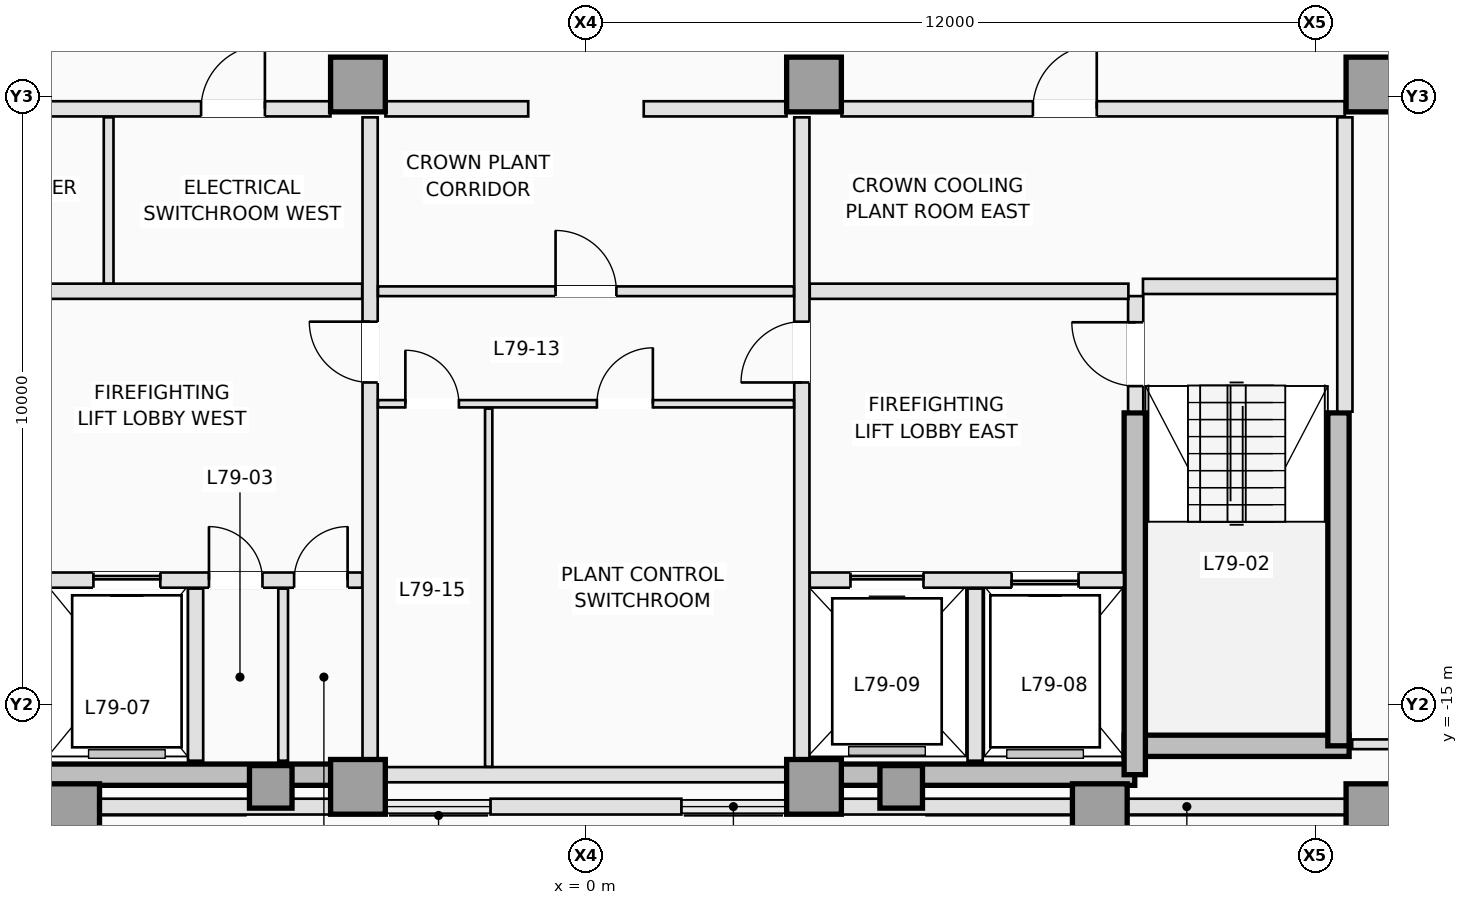
"""IFC4 building model, lengths in metres.
Left out: names, types, materials, properties, quantities, classifications, styles, units other than length and angle.
Written with IfcOpenShell. Run it as: python <this file> out.ifc"""

import sys

from ifc_helpers import new_model, si_unit, direction, frame, frame_2d, origin, origin_2d, place, context, subcontext, project, spatial, rectangle, extrude, element, fill, save


model = new_model("IFC4")
c1 = context("Model", 3, precision=1e-05, world=origin(), true_north=direction((0.0, 1.0)))
c2 = subcontext(c1, "Body", "Model", "MODEL_VIEW")
j1 = project(units=[si_unit("LENGTHUNIT", "METRE"), si_unit("PLANEANGLEUNIT", "RADIAN")], contexts=[c1])
p1 = place(None, origin())
s1 = spatial("IfcSite", under=j1, at=p1, CompositionType="ELEMENT")
p2 = place(p1, origin())
s2 = spatial("IfcBuilding", under=s1, at=p2, CompositionType="ELEMENT")
p3 = place(p2, frame((0.0, 0.0, 283.7)))
s3 = spatial("IfcBuildingStorey", under=s2, at=p3, CompositionType="ELEMENT", Elevation=283.7)
for number, where, z_axis, x_axis in (
    (1, (-9.025, -16.15, 0.0), (0.0, 0.0, 1.0), (1.0, 0.0, 0.0)),
    (2, (3.75, -16.15, 0.0), (0.0, 0.0, 1.0), (1.0, 0.0, 0.0)),
):
    element("IfcWall", number, at=place(p3, frame(where, z_axis=z_axis, x_axis=x_axis)), inside=s3, PredefinedType="SHEAR", context=c2, shape_type="SweptSolid", body=[
        extrude(rectangle(XDim=5.275, YDim=0.35, at=frame_2d((2.637, 0.0))), origin(), (0.0, 0.0, 1.0), 3.2),
    ])
p4 = place(p3, frame((8.85, -15.675, 0.0), z_axis=(0.0, 0.0, 1.0), x_axis=(1.0, 0.0, 0.0)))
e3 = element("IfcWall", 3, at=p4, inside=s3, PredefinedType="SHEAR", context=c2, shape_type="SweptSolid", body=[
    extrude(rectangle(XDim=3.7, YDim=0.35, at=frame_2d((1.85, 0.0))), origin(), (0.0, 0.0, 1.0), 3.2),
])
p5 = place(p3, frame((12.375, -15.675, 0.0), z_axis=(0.0, 0.0, 1.0), x_axis=(0.0, 1.0, 0.0)))
e4 = element("IfcWall", 4, at=p5, inside=s3, PredefinedType="SHEAR", context=c2, shape_type="SweptSolid", body=[
    extrude(rectangle(XDim=5.475, YDim=0.35, at=frame_2d((2.738, 0.0))), origin(), (0.0, 0.0, 1.0), 3.2),
])
p6 = place(p3, frame((9.025, -16.15, 0.0), z_axis=(0.0, 0.0, 1.0), x_axis=(0.0, 1.0, 0.0)))
e5 = element("IfcWall", 5, at=p6, inside=s3, PredefinedType="SHEAR", context=c2, shape_type="SweptSolid", body=[
    extrude(rectangle(XDim=5.95, YDim=0.35, at=frame_2d((2.975, 0.0))), origin(), (0.0, 0.0, 1.0), 3.2),
])
for number, where, z_axis, x_axis in (
    (6, (-8.45, -16.75, 0.0), (0.0, 0.0, 1.0), (1.0, 0.0, 0.0)),
    (7, (-3.75, -16.35, 0.0), (0.0, 0.0, 1.0), (1.0, 0.0, 0.0)),
    (8, (3.75, -16.35, 0.0), (0.0, 0.0, 1.0), (1.0, 0.0, 0.0)),
    (9, (8.45, -16.75, 0.0), (0.0, 0.0, 1.0), (1.0, 0.0, 0.0)),
    (10, (12.95, -16.75, 0.0), (0.0, 0.0, 1.0), (1.0, 0.0, 0.0)),
    (11, (-3.75, -4.8, 0.0), (0.0, 0.0, 1.0), (1.0, 0.0, 0.0)),
    (12, (3.75, -4.8, 0.0), (0.0, 0.0, 1.0), (1.0, 0.0, 0.0)),
    (13, (12.95, -4.8, 0.0), (0.0, 0.0, 1.0), (1.0, 0.0, 0.0)),
):
    element("IfcColumn", number, at=place(p3, frame(where, z_axis=z_axis, x_axis=x_axis)), inside=s3, PredefinedType="COLUMN", context=c2, shape_type="SweptSolid", body=[
        extrude(rectangle(XDim=0.9, YDim=0.9, at=origin_2d()), origin(), (0.0, 0.0, 1.0), 3.2),
    ])
for number, where, z_axis, x_axis in (
    (14, (-5.184, -16.35, 0.0), (0.0, 0.0, 1.0), (0.0, 1.0, 0.0)),
    (15, (5.184, -16.35, 0.0), (0.0, 0.0, 1.0), (0.0, 1.0, 0.0)),
):
    element("IfcColumn", number, at=place(p3, frame(where, z_axis=z_axis, x_axis=x_axis)), inside=s3, PredefinedType="COLUMN", context=c2, shape_type="SweptSolid", body=[
        extrude(rectangle(XDim=0.7, YDim=0.7, at=origin_2d()), origin(), (0.0, 0.0, 1.0), 3.2),
    ])
for number, where, z_axis, x_axis in (
    (16, (15.542, -16.675, 0.0), (0.0, 0.0, 1.0), (-1.0, 0.0, 0.0)),
    (17, (-4.22, -16.675, 0.0), (0.0, 0.0, 1.0), (-1.0, 0.0, 0.0)),
):
    element("IfcWall", number, at=place(p3, frame(where, z_axis=z_axis, x_axis=x_axis)), inside=s3, PredefinedType="STANDARD", context=c2, shape_type="SweptSolid", body=[
        extrude(rectangle(XDim=11.323, YDim=0.26, at=frame_2d((5.661, 0.0))), origin(), (0.0, 0.0, 1.0), 2.234),
    ])
p7 = place(p3, frame((1.569, -16.675, 0.0), z_axis=(0.0, 0.0, 1.0), x_axis=(-1.0, 0.0, 0.0)))
e18 = element("IfcWall", 18, at=p7, inside=s3, PredefinedType="STANDARD", context=c2, shape_type="SweptSolid", body=[
    extrude(rectangle(XDim=3.138, YDim=0.26, at=frame_2d((1.569, 0.0))), origin(), (0.0, 0.0, 1.0), 2.95),
])
p8 = place(p3, frame((13.283, -2.877, 0.0), z_axis=(0.0, 0.0, 1.0), x_axis=(0.490270316201, -0.871570431492, 0.0)))
e19 = element("IfcWall", 19, at=p8, inside=s3, PredefinedType="STANDARD", context=c2, shape_type="SweptSolid", body=[
    extrude(rectangle(XDim=10.216, YDim=0.26, at=frame_2d((5.108, 0.0))), origin(), (0.0, 0.0, 1.0), 2.95),
])
p9 = place(p3, frame((9.04, -10.18, 0.0), z_axis=(0.0, 0.0, 1.0), x_axis=(0.0, 1.0, 0.0)))
e20 = element("IfcWall", 20, at=p9, inside=s3, PredefinedType="PARTITIONING", context=c2, shape_type="SweptSolid", body=[
    extrude(rectangle(XDim=1.9, YDim=0.25, at=frame_2d((0.95, 0.0))), origin(), (0.0, 0.0, 1.0), 2.95),
])
p10 = place(p9, frame((0.42, 0.0, 0.0)))
e21 = element("IfcOpeningElement", 21, at=p10, cuts=e20, PredefinedType="OPENING", context=c2, shape_type="SweptSolid", body=[
    extrude(rectangle(XDim=1.05, YDim=2.15, at=frame_2d((0.525, 1.075))), frame((0.0, 0.135, 0.0), z_axis=(0.0, -1.0, 0.0), x_axis=(1.0, 0.0, 0.0)), (0.0, 0.0, 1.0), 0.27),
])
p11 = place(p3, frame((9.16, -8.12, 0.0), z_axis=(0.0, 0.0, 1.0), x_axis=(1.0, 0.0, 0.0)))
e22 = element("IfcWall", 22, at=p11, inside=s3, PredefinedType="PARTITIONING", context=c2, shape_type="SweptSolid", body=[
    extrude(rectangle(XDim=3.22, YDim=0.25, at=frame_2d((1.61, 0.0))), origin(), (0.0, 0.0, 1.0), 2.95),
])
p12 = place(p3, frame((12.48, -10.18, 0.0), z_axis=(0.0, 0.0, 1.0), x_axis=(0.0, 1.0, 0.0)))
e23 = element("IfcWall", 23, at=p12, inside=s3, PredefinedType="PARTITIONING", context=c2, shape_type="SweptSolid", body=[
    extrude(rectangle(XDim=4.84, YDim=0.25, at=frame_2d((2.42, 0.0))), origin(), (0.0, 0.0, 1.0), 2.95),
])
p13 = place(p3, frame((-8.848, -12.95, 0.0), z_axis=(0.0, 0.0, 1.0), x_axis=(1.0, 0.0, 0.0)))
e24 = element("IfcWall", 24, at=p13, inside=s3, PredefinedType="PARTITIONING", context=c2, shape_type="SweptSolid", body=[
    extrude(rectangle(XDim=5.168, YDim=0.25, at=frame_2d((2.584, 0.0))), origin(), (0.0, 0.0, 1.0), 2.95),
])
p14 = place(p13, frame((0.748, 0.0, 0.0)))
e25 = element("IfcOpeningElement", 25, at=p14, cuts=e24, PredefinedType="OPENING", context=c2, shape_type="SweptSolid", body=[
    extrude(rectangle(XDim=1.1, YDim=2.15, at=frame_2d((0.55, 1.075))), frame((0.0, 0.135, 0.0), z_axis=(0.0, -1.0, 0.0), x_axis=(1.0, 0.0, 0.0)), (0.0, 0.0, 1.0), 0.27),
])
p15 = place(p13, frame((2.648, 0.0, 0.0)))
e26 = element("IfcOpeningElement", 26, at=p15, cuts=e24, PredefinedType="OPENING", context=c2, shape_type="SweptSolid", body=[
    extrude(rectangle(XDim=0.88, YDim=2.1, at=frame_2d((0.44, 1.05))), frame((0.0, 0.135, 0.0), z_axis=(0.0, -1.0, 0.0), x_axis=(1.0, 0.0, 0.0)), (0.0, 0.0, 1.0), 0.27),
])
p16 = place(p13, frame((4.048, 0.0, 0.0)))
e27 = element("IfcOpeningElement", 27, at=p16, cuts=e24, PredefinedType="OPENING", context=c2, shape_type="SweptSolid", body=[
    extrude(rectangle(XDim=0.88, YDim=2.1, at=frame_2d((0.44, 1.05))), frame((0.0, 0.135, 0.0), z_axis=(0.0, -1.0, 0.0), x_axis=(1.0, 0.0, 0.0)), (0.0, 0.0, 1.0), 0.27),
])
p17 = place(p3, frame((3.68, -12.95, 0.0), z_axis=(0.0, 0.0, 1.0), x_axis=(1.0, 0.0, 0.0)))
e28 = element("IfcWall", 28, at=p17, inside=s3, PredefinedType="PARTITIONING", context=c2, shape_type="SweptSolid", body=[
    extrude(rectangle(XDim=5.168, YDim=0.25, at=frame_2d((2.584, 0.0))), origin(), (0.0, 0.0, 1.0), 2.95),
])
p18 = place(p17, frame((3.32, 0.0, 0.0)))
e29 = element("IfcOpeningElement", 29, at=p18, cuts=e28, PredefinedType="OPENING", context=c2, shape_type="SweptSolid", body=[
    extrude(rectangle(XDim=1.1, YDim=2.15, at=frame_2d((0.55, 1.075))), frame((0.0, 0.135, 0.0), z_axis=(0.0, -1.0, 0.0), x_axis=(1.0, 0.0, 0.0)), (0.0, 0.0, 1.0), 0.27),
])
p19 = place(p17, frame((0.67, 0.0, 0.0)))
e30 = element("IfcOpeningElement", 30, at=p19, cuts=e28, PredefinedType="OPENING", context=c2, shape_type="SweptSolid", body=[
    extrude(rectangle(XDim=1.2, YDim=2.15, at=frame_2d((0.6, 1.075))), frame((0.0, 0.135, 0.0), z_axis=(0.0, -1.0, 0.0), x_axis=(1.0, 0.0, 0.0)), (0.0, 0.0, 1.0), 0.27),
])
p20 = place(p3, frame((-6.42, -15.92, 0.0), z_axis=(0.0, 0.0, 1.0), x_axis=(0.0, 1.0, 0.0)))
e31 = element("IfcWall", 31, at=p20, inside=s3, PredefinedType="PARTITIONING", context=c2, shape_type="SweptSolid", body=[
    extrude(rectangle(XDim=2.83, YDim=0.25, at=frame_2d((1.415, 0.0))), origin(), (0.0, 0.0, 1.0), 2.95),
])
p21 = place(p3, frame((-4.98, -15.92, 0.0), z_axis=(0.0, 0.0, 1.0), x_axis=(0.0, 1.0, 0.0)))
e32 = element("IfcWall", 32, at=p21, inside=s3, PredefinedType="PARTITIONING", context=c2, shape_type="SweptSolid", body=[
    extrude(rectangle(XDim=2.83, YDim=0.16, at=frame_2d((1.415, 0.0))), origin(), (0.0, 0.0, 1.0), 2.95),
])
p22 = place(p3, frame((6.4, -15.92, 0.0), z_axis=(0.0, 0.0, 1.0), x_axis=(0.0, 1.0, 0.0)))
e33 = element("IfcWall", 33, at=p22, inside=s3, PredefinedType="PARTITIONING", context=c2, shape_type="SweptSolid", body=[
    extrude(rectangle(XDim=2.83, YDim=0.25, at=frame_2d((1.415, 0.0))), origin(), (0.0, 0.0, 1.0), 2.95),
])
for number, where, z_axis, x_axis in (
    (34, (-8.92, -8.2, 0.0), (0.0, 0.0, 1.0), (1.0, 0.0, 0.0)),
    (35, (3.68, -8.2, 0.0), (0.0, 0.0, 1.0), (1.0, 0.0, 0.0)),
):
    element("IfcWall", number, at=place(p3, frame(where, z_axis=z_axis, x_axis=x_axis)), inside=s3, PredefinedType="PARTITIONING", context=c2, shape_type="SweptSolid", body=[
        extrude(rectangle(XDim=5.24, YDim=0.25, at=frame_2d((2.62, 0.0))), origin(), (0.0, 0.0, 1.0), 2.95),
    ])
p23 = place(p3, frame((-3.55, -15.898, 0.0), z_axis=(0.0, 0.0, 1.0), x_axis=(0.0, 1.0, 0.0)))
e36 = element("IfcWall", 36, at=p23, inside=s3, PredefinedType="PARTITIONING", context=c2, shape_type="SweptSolid", body=[
    extrude(rectangle(XDim=10.558, YDim=0.25, at=frame_2d((5.279, 0.0))), origin(), (0.0, 0.0, 1.0), 2.95),
])
p24 = place(p23, frame((6.198, 0.0, 0.0)))
e37 = element("IfcOpeningElement", 37, at=p24, cuts=e36, PredefinedType="OPENING", context=c2, shape_type="SweptSolid", body=[
    extrude(rectangle(XDim=1.0, YDim=2.15, at=frame_2d((0.5, 1.075))), frame((0.0, 0.135, 0.0), z_axis=(0.0, -1.0, 0.0), x_axis=(1.0, 0.0, 0.0)), (0.0, 0.0, 1.0), 0.27),
])
p25 = place(p3, frame((3.55, -15.898, 0.0), z_axis=(0.0, 0.0, 1.0), x_axis=(0.0, 1.0, 0.0)))
e38 = element("IfcWall", 38, at=p25, inside=s3, PredefinedType="PARTITIONING", context=c2, shape_type="SweptSolid", body=[
    extrude(rectangle(XDim=10.558, YDim=0.25, at=frame_2d((5.279, 0.0))), origin(), (0.0, 0.0, 1.0), 2.95),
])
p26 = place(p25, frame((6.198, 0.0, 0.0)))
e39 = element("IfcOpeningElement", 39, at=p26, cuts=e38, PredefinedType="OPENING", context=c2, shape_type="SweptSolid", body=[
    extrude(rectangle(XDim=1.0, YDim=2.15, at=frame_2d((0.5, 1.075))), frame((0.0, 0.135, 0.0), z_axis=(0.0, -1.0, 0.0), x_axis=(1.0, 0.0, 0.0)), (0.0, 0.0, 1.0), 0.27),
])
p27 = place(p3, frame((-12.48, -5.2, 0.0), z_axis=(0.0, 0.0, 1.0), x_axis=(1.0, 0.0, 0.0)))
e40 = element("IfcWall", 40, at=p27, inside=s3, PredefinedType="PARTITIONING", context=c2, shape_type="SweptSolid", body=[
    extrude(rectangle(XDim=8.278, YDim=0.25, at=frame_2d((4.139, 0.0))), origin(), (0.0, 0.0, 1.0), 2.95),
])
p28 = place(p27, frame((1.85, 0.0, 0.0)))
e41 = element("IfcOpeningElement", 41, at=p28, cuts=e40, PredefinedType="OPENING", context=c2, shape_type="SweptSolid", body=[
    extrude(rectangle(XDim=1.05, YDim=2.12, at=frame_2d((0.525, 1.06))), frame((0.0, 0.135, 0.0), z_axis=(0.0, -1.0, 0.0), x_axis=(1.0, 0.0, 0.0)), (0.0, 0.0, 1.0), 0.27),
])
p29 = place(p27, frame((6.15, 0.0, 0.0)))
e42 = element("IfcOpeningElement", 42, at=p29, cuts=e40, PredefinedType="OPENING", context=c2, shape_type="SweptSolid", body=[
    extrude(rectangle(XDim=1.05, YDim=2.12, at=frame_2d((0.525, 1.06))), frame((0.0, 0.135, 0.0), z_axis=(0.0, -1.0, 0.0), x_axis=(1.0, 0.0, 0.0)), (0.0, 0.0, 1.0), 0.27),
])
p30 = place(p3, frame((4.202, -5.2, 0.0), z_axis=(0.0, 0.0, 1.0), x_axis=(1.0, 0.0, 0.0)))
e43 = element("IfcWall", 43, at=p30, inside=s3, PredefinedType="PARTITIONING", context=c2, shape_type="SweptSolid", body=[
    extrude(rectangle(XDim=8.278, YDim=0.25, at=frame_2d((4.139, 0.0))), origin(), (0.0, 0.0, 1.0), 2.95),
])
p31 = place(p30, frame((3.148, 0.0, 0.0)))
e44 = element("IfcOpeningElement", 44, at=p31, cuts=e43, PredefinedType="OPENING", context=c2, shape_type="SweptSolid", body=[
    extrude(rectangle(XDim=1.05, YDim=2.12, at=frame_2d((0.525, 1.06))), frame((0.0, 0.135, 0.0), z_axis=(0.0, -1.0, 0.0), x_axis=(1.0, 0.0, 0.0)), (0.0, 0.0, 1.0), 0.27),
])
for number, where, z_axis, x_axis in (
    (45, (-3.298, -5.2, 0.0), (0.0, 0.0, 1.0), (1.0, 0.0, 0.0)),
    (46, (0.95, -5.2, 0.0), (0.0, 0.0, 1.0), (1.0, 0.0, 0.0)),
):
    element("IfcWall", number, at=place(p3, frame(where, z_axis=z_axis, x_axis=x_axis)), inside=s3, PredefinedType="PARTITIONING", context=c2, shape_type="SweptSolid", body=[
        extrude(rectangle(XDim=2.348, YDim=0.25, at=frame_2d((1.174, 0.0))), origin(), (0.0, 0.0, 1.0), 2.95),
    ])
p32 = place(p3, frame((-7.85, -8.073, 0.0), z_axis=(0.0, 0.0, 1.0), x_axis=(0.0, 1.0, 0.0)))
e47 = element("IfcWall", 47, at=p32, inside=s3, PredefinedType="PARTITIONING", context=c2, shape_type="SweptSolid", body=[
    extrude(rectangle(XDim=2.733, YDim=0.16, at=frame_2d((1.366, 0.0))), origin(), (0.0, 0.0, 1.0), 2.95),
])
p33 = place(p3, frame((-3.298, -16.15, 0.0), z_axis=(0.0, 0.0, 1.0), x_axis=(1.0, 0.0, 0.0)))
e48 = element("IfcWall", 48, at=p33, inside=s3, PredefinedType="PARTITIONING", context=c2, shape_type="SweptSolid", body=[
    extrude(rectangle(XDim=6.596, YDim=0.25, at=frame_2d((3.298, 0.0))), origin(), (0.0, 0.0, 1.0), 2.544),
])
p34 = place(p3, frame((-3.42, -8.2, 0.0), z_axis=(0.0, 0.0, 1.0), x_axis=(1.0, 0.0, 0.0)))
e49 = element("IfcWall", 49, at=p34, inside=s3, PredefinedType="PARTITIONING", context=c2, shape_type="SweptSolid", body=[
    extrude(rectangle(XDim=6.84, YDim=0.16, at=frame_2d((3.42, 0.0))), origin(), (0.0, 0.0, 1.0), 2.95),
])
p35 = place(p34, frame((2.92, 0.0, 0.0)))
e50 = element("IfcOpeningElement", 50, at=p35, cuts=e49, PredefinedType="OPENING", context=c2, shape_type="SweptSolid", body=[
    extrude(rectangle(XDim=1.0, YDim=2.15, at=frame_2d((0.5, 1.075))), frame((0.0, 0.09, 0.0), z_axis=(0.0, -1.0, 0.0), x_axis=(1.0, 0.0, 0.0)), (0.0, 0.0, 1.0), 0.18),
])
p36 = place(p3, frame((-3.42, -10.05, 0.0), z_axis=(0.0, 0.0, 1.0), x_axis=(1.0, 0.0, 0.0)))
e51 = element("IfcWall", 51, at=p36, inside=s3, PredefinedType="PARTITIONING", context=c2, shape_type="SweptSolid", body=[
    extrude(rectangle(XDim=6.84, YDim=0.12, at=frame_2d((3.42, 0.0))), origin(), (0.0, 0.0, 1.0), 2.95),
])
p37 = place(p36, frame((0.45, 0.0, 0.0)))
e52 = element("IfcOpeningElement", 52, at=p37, cuts=e51, PredefinedType="OPENING", context=c2, shape_type="SweptSolid", body=[
    extrude(rectangle(XDim=0.88, YDim=2.12, at=frame_2d((0.44, 1.06))), frame((0.0, 0.07, 0.0), z_axis=(0.0, -1.0, 0.0), x_axis=(1.0, 0.0, 0.0)), (0.0, 0.0, 1.0), 0.14),
])
p38 = place(p36, frame((3.6, 0.0, 0.0)))
e53 = element("IfcOpeningElement", 53, at=p38, cuts=e51, PredefinedType="OPENING", context=c2, shape_type="SweptSolid", body=[
    extrude(rectangle(XDim=0.92, YDim=2.12, at=frame_2d((0.46, 1.06))), frame((0.0, 0.07, 0.0), z_axis=(0.0, -1.0, 0.0), x_axis=(1.0, 0.0, 0.0)), (0.0, 0.0, 1.0), 0.14),
])
p39 = place(p3, frame((-1.6, -16.02, 0.0), z_axis=(0.0, 0.0, 1.0), x_axis=(0.0, 1.0, 0.0)))
e54 = element("IfcWall", 54, at=p39, inside=s3, PredefinedType="PARTITIONING", context=c2, shape_type="SweptSolid", body=[
    extrude(rectangle(XDim=5.89, YDim=0.12, at=frame_2d((2.945, 0.0))), origin(), (0.0, 0.0, 1.0), 2.95),
])
p40 = place(p3, frame((12.6, -15.65, 0.0), z_axis=(0.0, 0.0, 1.0), x_axis=(1.0, 0.0, 0.0)))
e55 = element("IfcWall", 55, at=p40, inside=s3, PredefinedType="PARTITIONING", context=c2, shape_type="SweptSolid", body=[
    extrude(rectangle(XDim=3.143, YDim=0.16, at=frame_2d((1.571, 0.0))), origin(), (0.0, 0.0, 1.0), 2.95),
])
p41 = place(p14, origin())
e56 = element("IfcDoor", 56, at=p41, inside=s3, OperationType="SLIDING_TO_LEFT", PredefinedType="DOOR", context=c2, shape_type="SweptSolid", body=[
    extrude(rectangle(XDim=1.1, YDim=2.15, at=frame_2d((0.55, 1.075))), frame((0.0, 0.025, 0.0), z_axis=(0.0, -1.0, 0.0), x_axis=(1.0, 0.0, 0.0)), (0.0, 0.0, 1.0), 0.05),
])
fill(e25, e56)
p42 = place(p18, origin())
e57 = element("IfcDoor", 57, at=p42, inside=s3, OperationType="SLIDING_TO_RIGHT", PredefinedType="DOOR", context=c2, shape_type="SweptSolid", body=[
    extrude(rectangle(XDim=1.1, YDim=2.15, at=frame_2d((0.55, 1.075))), frame((0.0, 0.025, 0.0), z_axis=(0.0, -1.0, 0.0), x_axis=(1.0, 0.0, 0.0)), (0.0, 0.0, 1.0), 0.05),
])
fill(e29, e57)
p43 = place(p19, origin())
e58 = element("IfcDoor", 58, at=p43, inside=s3, OperationType="SLIDING_TO_LEFT", PredefinedType="DOOR", context=c2, shape_type="SweptSolid", body=[
    extrude(rectangle(XDim=1.2, YDim=2.15, at=frame_2d((0.6, 1.075))), frame((0.0, 0.025, 0.0), z_axis=(0.0, -1.0, 0.0), x_axis=(1.0, 0.0, 0.0)), (0.0, 0.0, 1.0), 0.05),
])
fill(e30, e58)
p44 = place(p10, origin())
e59 = element("IfcDoor", 59, at=p44, inside=s3, OperationType="SINGLE_SWING_RIGHT", PredefinedType="DOOR", context=c2, shape_type="SweptSolid", body=[
    extrude(rectangle(XDim=1.05, YDim=2.15, at=frame_2d((0.525, 1.075))), frame((0.0, 0.025, 0.0), z_axis=(0.0, -1.0, 0.0), x_axis=(1.0, 0.0, 0.0)), (0.0, 0.0, 1.0), 0.05),
])
fill(e21, e59)
p45 = place(p15, origin())
e60 = element("IfcDoor", 60, at=p45, inside=s3, OperationType="SINGLE_SWING_LEFT", PredefinedType="TRAPDOOR", context=c2, shape_type="SweptSolid", body=[
    extrude(rectangle(XDim=0.88, YDim=2.1, at=frame_2d((0.44, 1.05))), frame((0.0, 0.025, 0.0), z_axis=(0.0, -1.0, 0.0), x_axis=(1.0, 0.0, 0.0)), (0.0, 0.0, 1.0), 0.05),
])
fill(e26, e60)
p46 = place(p16, origin())
e61 = element("IfcDoor", 61, at=p46, inside=s3, OperationType="SINGLE_SWING_RIGHT", PredefinedType="TRAPDOOR", context=c2, shape_type="SweptSolid", body=[
    extrude(rectangle(XDim=0.88, YDim=2.1, at=frame_2d((0.44, 1.05))), frame((0.0, 0.025, 0.0), z_axis=(0.0, -1.0, 0.0), x_axis=(1.0, 0.0, 0.0)), (0.0, 0.0, 1.0), 0.05),
])
fill(e27, e61)
p47 = place(p24, origin())
e62 = element("IfcDoor", 62, at=p47, inside=s3, OperationType="SINGLE_SWING_RIGHT", PredefinedType="DOOR", context=c2, shape_type="SweptSolid", body=[
    extrude(rectangle(XDim=1.0, YDim=2.15, at=frame_2d((0.5, 1.075))), frame((0.0, 0.025, 0.0), z_axis=(0.0, -1.0, 0.0), x_axis=(1.0, 0.0, 0.0)), (0.0, 0.0, 1.0), 0.05),
])
fill(e37, e62)
p48 = place(p26, origin())
e63 = element("IfcDoor", 63, at=p48, inside=s3, OperationType="SINGLE_SWING_LEFT", PredefinedType="DOOR", context=c2, shape_type="SweptSolid", body=[
    extrude(rectangle(XDim=1.0, YDim=2.15, at=frame_2d((0.5, 1.075))), frame((0.0, 0.025, 0.0), z_axis=(0.0, -1.0, 0.0), x_axis=(1.0, 0.0, 0.0)), (0.0, 0.0, 1.0), 0.05),
])
fill(e39, e63)
p49 = place(p29, origin())
e64 = element("IfcDoor", 64, at=p49, inside=s3, OperationType="SINGLE_SWING_RIGHT", PredefinedType="DOOR", context=c2, shape_type="SweptSolid", body=[
    extrude(rectangle(XDim=1.05, YDim=2.12, at=frame_2d((0.525, 1.06))), frame((0.0, 0.025, 0.0), z_axis=(0.0, -1.0, 0.0), x_axis=(1.0, 0.0, 0.0)), (0.0, 0.0, 1.0), 0.05),
])
fill(e42, e64)
p50 = place(p31, origin())
e65 = element("IfcDoor", 65, at=p50, inside=s3, OperationType="SINGLE_SWING_RIGHT", PredefinedType="DOOR", context=c2, shape_type="SweptSolid", body=[
    extrude(rectangle(XDim=1.05, YDim=2.12, at=frame_2d((0.525, 1.06))), frame((0.0, 0.025, 0.0), z_axis=(0.0, -1.0, 0.0), x_axis=(1.0, 0.0, 0.0)), (0.0, 0.0, 1.0), 0.05),
])
fill(e44, e65)
p51 = place(p35, origin())
e66 = element("IfcDoor", 66, at=p51, inside=s3, OperationType="SINGLE_SWING_LEFT", PredefinedType="DOOR", context=c2, shape_type="SweptSolid", body=[
    extrude(rectangle(XDim=1.0, YDim=2.15, at=frame_2d((0.5, 1.075))), frame((0.0, 0.025, 0.0), z_axis=(0.0, -1.0, 0.0), x_axis=(1.0, 0.0, 0.0)), (0.0, 0.0, 1.0), 0.05),
])
fill(e50, e66)
p52 = place(p37, origin())
e67 = element("IfcDoor", 67, at=p52, inside=s3, OperationType="SINGLE_SWING_LEFT", PredefinedType="DOOR", context=c2, shape_type="SweptSolid", body=[
    extrude(rectangle(XDim=0.88, YDim=2.12, at=frame_2d((0.44, 1.06))), frame((0.0, 0.025, 0.0), z_axis=(0.0, -1.0, 0.0), x_axis=(1.0, 0.0, 0.0)), (0.0, 0.0, 1.0), 0.05),
])
fill(e52, e67)
p53 = place(p38, origin())
e68 = element("IfcDoor", 68, at=p53, inside=s3, OperationType="SINGLE_SWING_RIGHT", PredefinedType="DOOR", context=c2, shape_type="SweptSolid", body=[
    extrude(rectangle(XDim=0.92, YDim=2.12, at=frame_2d((0.46, 1.06))), frame((0.0, 0.025, 0.0), z_axis=(0.0, -1.0, 0.0), x_axis=(1.0, 0.0, 0.0)), (0.0, 0.0, 1.0), 0.05),
])
fill(e53, e68)
save(model, sys.argv[1])
